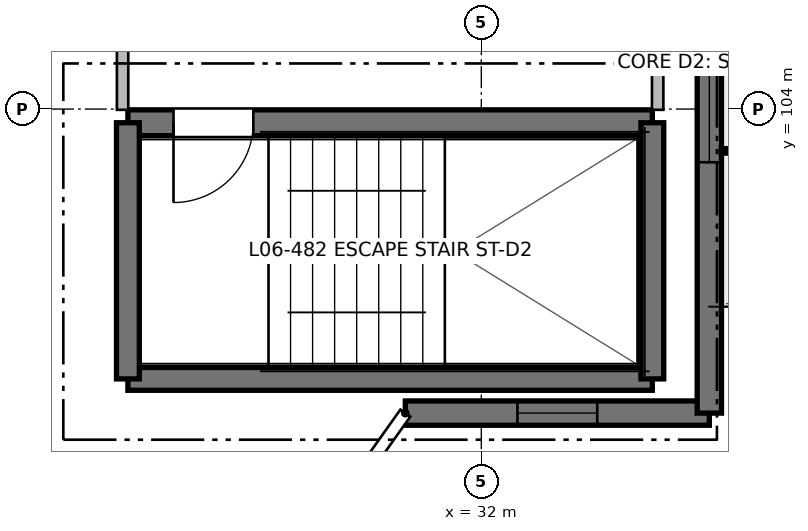
"""IFC4 building model, lengths in metres.
Left out: names, types, materials, properties, quantities, classifications, styles, units other than length and angle.
Written with IfcOpenShell. Run it as: python <this file> out.ifc"""

import sys

from ifc_helpers import new_model, si_unit, direction, frame, frame_2d, origin, place, context, subcontext, project, spatial, rectangle, extrude, element, fill, save


model = new_model("IFC4")
c1 = context("Model", 3, precision=1e-05, world=origin(), true_north=direction((0.0, 1.0)))
c2 = subcontext(c1, "Body", "Model", "MODEL_VIEW")
j1 = project(units=[si_unit("LENGTHUNIT", "METRE"), si_unit("PLANEANGLEUNIT", "RADIAN")], contexts=[c1])
p1 = place(None, origin())
s1 = spatial("IfcSite", under=j1, at=p1, CompositionType="ELEMENT")
p2 = place(p1, origin())
s2 = spatial("IfcBuilding", under=s1, at=p2, CompositionType="ELEMENT")
p3 = place(p2, frame((0.0, 0.0, 20.16)))
s3 = spatial("IfcBuildingStorey", under=s2, at=p3, CompositionType="ELEMENT", Elevation=20.16)
p4 = place(p3, frame((27.35, 100.45, 0.0), z_axis=(0.0, 0.0, 1.0), x_axis=(1.0, 0.0, 0.0)))
e1 = element("IfcWall", 1, at=p4, inside=s3, PredefinedType="SHEAR", context=c2, shape_type="SweptSolid", body=[
    extrude(rectangle(XDim=6.9, YDim=0.3, at=frame_2d((3.45, 0.0))), origin(), (0.0, 0.0, 1.0), 3.2),
])
p5 = place(p3, frame((34.25, 103.82, 0.0), z_axis=(0.0, 0.0, 1.0), x_axis=(-1.0, 0.0, 0.0)))
e2 = element("IfcWall", 2, at=p5, inside=s3, PredefinedType="SHEAR", context=c2, shape_type="SweptSolid", body=[
    extrude(rectangle(XDim=6.9, YDim=0.34, at=frame_2d((3.45, 0.0))), origin(), (0.0, 0.0, 1.0), 3.2),
])
p6 = place(p5, frame((5.25, 0.0, 0.0)))
e3 = element("IfcOpeningElement", 3, at=p6, cuts=e2, PredefinedType="OPENING", context=c2, shape_type="SweptSolid", body=[
    extrude(rectangle(XDim=1.05, YDim=2.15, at=frame_2d((0.525, 1.075))), frame((0.0, 0.18, 0.0), z_axis=(0.0, -1.0, 0.0), x_axis=(1.0, 0.0, 0.0)), (0.0, 0.0, 1.0), 0.36),
])
for number, where, z_axis, x_axis in (
    (4, (27.35, 103.82, 0.0), (0.0, 0.0, 1.0), (0.0, -1.0, 0.0)),
    (5, (34.25, 100.45, 0.0), (0.0, 0.0, 1.0), (0.0, 1.0, 0.0)),
):
    element("IfcWall", number, at=place(p3, frame(where, z_axis=z_axis, x_axis=x_axis)), inside=s3, PredefinedType="SHEAR", context=c2, shape_type="SweptSolid", body=[
        extrude(rectangle(XDim=3.37, YDim=0.3, at=frame_2d((1.685, 0.0))), origin(), (0.0, 0.0, 1.0), 3.2),
    ])
p7 = place(p3, frame((35.0, 100.0, 0.0), z_axis=(0.0, 0.0, 1.0), x_axis=(-1.0, 0.0, 0.0)))
e6 = element("IfcWall", 6, at=p7, inside=s3, PredefinedType="SHEAR", context=c2, shape_type="SweptSolid", body=[
    extrude(rectangle(XDim=4.0, YDim=0.32, at=frame_2d((2.0, 0.0))), origin(), (0.0, 0.0, 1.0), 2.98),
])
p8 = place(p7, frame((1.475, 0.0, 0.9)))
e7 = element("IfcOpeningElement", 7, at=p8, cuts=e6, PredefinedType="OPENING", context=c2, shape_type="SweptSolid", body=[
    extrude(rectangle(XDim=1.05, YDim=1.15, at=frame_2d((0.525, 0.575))), frame((0.0, 0.17, 0.0), z_axis=(0.0, -1.0, 0.0), x_axis=(1.0, 0.0, 0.0)), (0.0, 0.0, 1.0), 0.34),
])
p9 = place(p3, frame((35.0, 113.8, 0.0), z_axis=(0.0, 0.0, 1.0), x_axis=(0.0, -1.0, 0.0)))
e8 = element("IfcWall", 8, at=p9, inside=s3, PredefinedType="SHEAR", context=c2, shape_type="SweptSolid", body=[
    extrude(rectangle(XDim=13.8, YDim=0.32, at=frame_2d((6.9, 0.0))), origin(), (0.0, 0.0, 1.0), 2.98),
])
p10 = place(p9, frame((6.3, 0.0, 0.0)))
e9 = element("IfcOpeningElement", 9, at=p10, cuts=e8, PredefinedType="OPENING", context=c2, shape_type="SweptSolid", body=[
    extrude(rectangle(XDim=1.2, YDim=2.2, at=frame_2d((0.6, 1.1))), frame((0.0, 0.17, 0.0), z_axis=(0.0, -1.0, 0.0), x_axis=(1.0, 0.0, 0.0)), (0.0, 0.0, 1.0), 0.34),
])
p11 = place(p9, frame((8.2, 0.0, 0.57)))
e10 = element("IfcOpeningElement", 10, at=p11, cuts=e8, PredefinedType="OPENING", context=c2, shape_type="SweptSolid", body=[
    extrude(rectangle(XDim=2.3, YDim=1.65, at=frame_2d((1.15, 0.825))), frame((0.0, 0.17, 0.0), z_axis=(0.0, -1.0, 0.0), x_axis=(1.0, 0.0, 0.0)), (0.0, 0.0, 1.0), 0.34),
])
for number, where, z_axis, x_axis in (
    (11, (27.28, 103.99, 0.0), (0.0, 0.0, 1.0), (0.0, 1.0, 0.0)),
    (12, (34.32, 103.99, 0.0), (0.0, 0.0, 1.0), (0.0, 1.0, 0.0)),
):
    element("IfcWall", number, at=place(p3, frame(where, z_axis=z_axis, x_axis=x_axis)), inside=s3, PredefinedType="PARTITIONING", context=c2, shape_type="SweptSolid", body=[
        extrude(rectangle(XDim=2.73, YDim=0.15, at=frame_2d((1.365, 0.0))), origin(), (0.0, 0.0, 1.0), 2.935),
    ])
p12 = place(p6, origin())
e13 = element("IfcDoor", 13, at=p12, inside=s3, OperationType="SINGLE_SWING_RIGHT", PredefinedType="DOOR", context=c2, shape_type="SweptSolid", body=[
    extrude(rectangle(XDim=1.05, YDim=2.15, at=frame_2d((0.525, 1.075))), frame((0.0, 0.025, 0.0), z_axis=(0.0, -1.0, 0.0), x_axis=(1.0, 0.0, 0.0)), (0.0, 0.0, 1.0), 0.05),
])
fill(e3, e13)
p13 = place(p8, origin())
e14 = element("IfcWindow", 14, at=p13, inside=s3, PartitioningType="SINGLE_PANEL", PredefinedType="WINDOW", context=c2, shape_type="SweptSolid", body=[
    extrude(rectangle(XDim=1.05, YDim=1.15, at=frame_2d((0.525, 0.575))), frame((0.0, 0.03, 0.0), z_axis=(0.0, -1.0, 0.0), x_axis=(1.0, 0.0, 0.0)), (0.0, 0.0, 1.0), 0.06),
])
fill(e7, e14)
p14 = place(p11, origin())
e15 = element("IfcWindow", 15, at=p14, inside=s3, PartitioningType="SINGLE_PANEL", PredefinedType="WINDOW", context=c2, shape_type="SweptSolid", body=[
    extrude(rectangle(XDim=2.3, YDim=1.65, at=frame_2d((1.15, 0.825))), frame((0.0, 0.03, 0.0), z_axis=(0.0, -1.0, 0.0), x_axis=(1.0, 0.0, 0.0)), (0.0, 0.0, 1.0), 0.06),
])
fill(e10, e15)
save(model, sys.argv[1])
